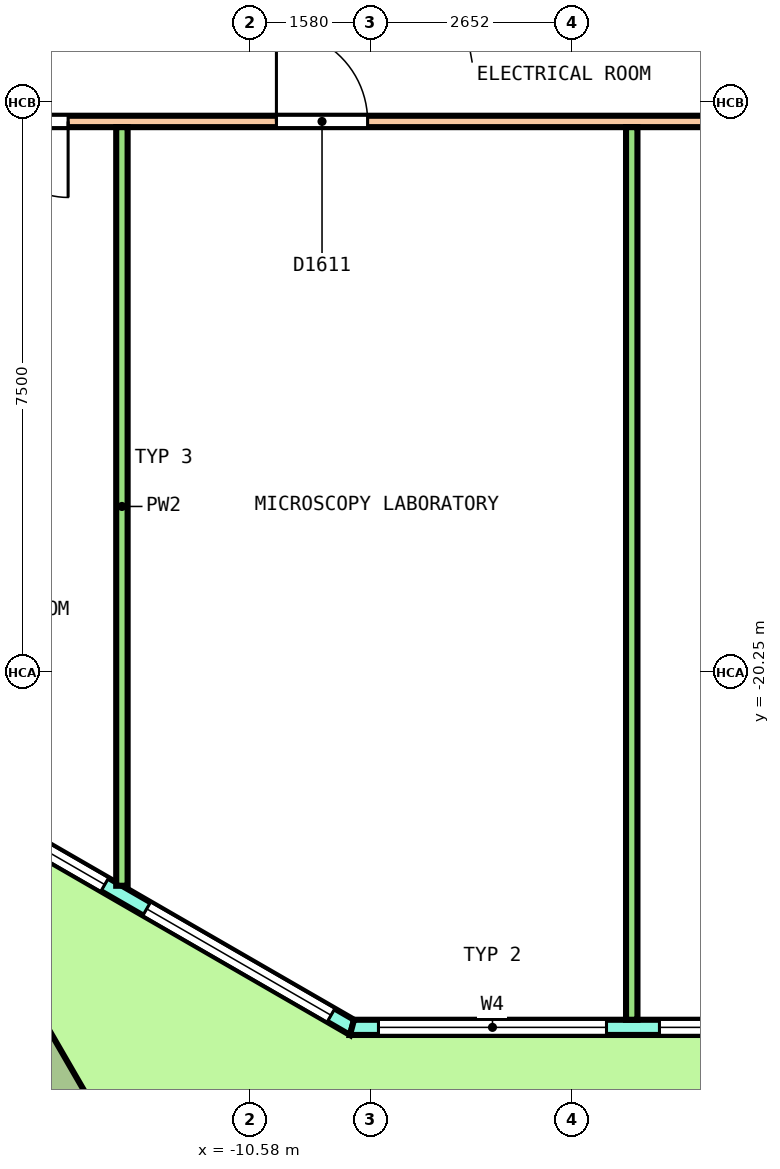
"""IFC4 building model, lengths in metres.
Left out: names, types, materials, properties, quantities, classifications, styles, units other than length and angle.
Written with IfcOpenShell. Run it as: python <this file> out.ifc"""

import sys

from ifc_helpers import new_model, si_unit, direction, frame, frame_2d, origin, origin_2d, place, context, subcontext, project, spatial, polyline, rectangle, outline, extrude, element, fill, save


model = new_model("IFC4")
c1 = context("Model", 3, precision=1e-05, world=origin(), true_north=direction((0.0, 1.0)))
c2 = subcontext(c1, "Body", "Model", "MODEL_VIEW")
j1 = project(units=[si_unit("LENGTHUNIT", "METRE"), si_unit("PLANEANGLEUNIT", "RADIAN")], contexts=[c1])
p1 = place(None, origin())
s1 = spatial("IfcSite", under=j1, at=p1, CompositionType="ELEMENT")
p2 = place(p1, origin())
s2 = spatial("IfcBuilding", under=s1, at=p2, CompositionType="ELEMENT")
p3 = place(p2, frame((0.0, 0.0, 113.2)))
s3 = spatial("IfcBuildingStorey", under=s2, at=p3, CompositionType="ELEMENT", Elevation=113.2)
p4 = place(p3, frame((-13.618, -25.625, 0.0), z_axis=(0.018132630042, -0.031385715123, 0.999342856388), x_axis=(0.866156195426, -0.498787200508, -0.031381104725)))
e1 = element("IfcColumn", 1, at=p4, inside=s3, PredefinedType="COLUMN", context=c2, shape_type="SweptSolid", body=[
    extrude(rectangle(XDim=1.35, YDim=1.35, at=origin_2d()), origin(), (0.0, 0.0, 1.0), 4.053),
])
p5 = place(p3, frame((-15.195, -21.481, 0.0), z_axis=(0.0, 0.0, 1.0), x_axis=(0.866029458321, -0.49999297727, 0.0)))
e2 = element("IfcWall", 2, at=p5, inside=s3, PredefinedType="SOLIDWALL", context=c2, shape_type="SweptSolid", body=[
    extrude(outline(polyline([(-0.027, -0.1), (1.128, -0.1), (2.282, -0.1), (3.437, -0.1), (4.592, -0.1), (5.747, -0.1), (6.901, -0.1), (6.848, 0.1), (5.711, 0.1), (4.574, 0.1), (3.437, 0.1), (2.301, 0.1), (1.164, 0.1), (0.027, 0.1), (-0.027, -0.1)])), origin(), (0.0, 0.0, 1.0), 4.1),
])
p6 = place(p5, frame((0.319, 0.0, 0.1)))
e3 = element("IfcOpeningElement", 3, at=p6, cuts=e2, PredefinedType="OPENING", context=c2, shape_type="SweptSolid", body=[
    extrude(rectangle(XDim=2.8, YDim=2.9, at=frame_2d((1.4, 1.45))), frame((0.0, 0.11, 0.0), z_axis=(0.0, -1.0, 0.0), x_axis=(1.0, 0.0, 0.0)), (0.0, 0.0, 1.0), 0.22),
])
p7 = place(p5, frame((3.756, 0.0, 0.1)))
e4 = element("IfcOpeningElement", 4, at=p7, cuts=e2, PredefinedType="OPENING", context=c2, shape_type="SweptSolid", body=[
    extrude(rectangle(XDim=2.8, YDim=2.9, at=frame_2d((1.4, 1.45))), frame((0.0, 0.11, 0.0), z_axis=(0.0, -1.0, 0.0), x_axis=(1.0, 0.0, 0.0)), (0.0, 0.0, 1.0), 0.22),
])
p8 = place(p3, frame((-9.242, -24.918, 0.0), z_axis=(0.0, 0.0, 1.0), x_axis=(1.0, 0.0, 0.0)))
e5 = element("IfcWall", 5, at=p8, inside=s3, PredefinedType="SOLIDWALL", context=c2, shape_type="SweptSolid", body=[
    extrude(outline(polyline([(-0.027, -0.1), (1.003, -0.1), (2.033, -0.1), (3.063, -0.1), (4.093, -0.1), (5.122, -0.1), (6.152, -0.1), (7.182, -0.1), (8.212, -0.1), (9.242, -0.1), (10.271, -0.1), (11.301, -0.1), (12.331, -0.1), (13.361, -0.1), (14.391, -0.1), (15.421, -0.1), (16.451, -0.1), (17.48, -0.1), (18.51, -0.1), (18.457, 0.1), (17.433, 0.1), (16.409, 0.1), (15.385, 0.1), (14.361, 0.1), (13.337, 0.1), (12.313, 0.1), (11.29, 0.1), (10.266, 0.1), (9.242, 0.1), (8.218, 0.1), (7.194, 0.1), (6.17, 0.1), (5.146, 0.1), (4.122, 0.1), (3.098, 0.1), (2.075, 0.1), (1.051, 0.1), (0.027, 0.1), (-0.027, -0.1)])), origin(), (0.0, 0.0, 1.0), 4.1),
])
p9 = place(p8, frame((0.348, 0.0, 0.1)))
e6 = element("IfcOpeningElement", 6, at=p9, cuts=e5, PredefinedType="OPENING", context=c2, shape_type="SweptSolid", body=[
    extrude(rectangle(XDim=3.0, YDim=2.9, at=frame_2d((1.5, 1.45))), frame((0.0, 0.11, 0.0), z_axis=(0.0, -1.0, 0.0), x_axis=(1.0, 0.0, 0.0)), (0.0, 0.0, 1.0), 0.22),
])
p10 = place(p8, frame((4.045, 0.0, 0.1)))
e7 = element("IfcOpeningElement", 7, at=p10, cuts=e5, PredefinedType="OPENING", context=c2, shape_type="SweptSolid", body=[
    extrude(rectangle(XDim=3.0, YDim=2.9, at=frame_2d((1.5, 1.45))), frame((0.0, 0.11, 0.0), z_axis=(0.0, -1.0, 0.0), x_axis=(1.0, 0.0, 0.0)), (0.0, 0.0, 1.0), 0.22),
])
p11 = place(p8, frame((8.342, 0.0, 0.0)))
e8 = element("IfcOpeningElement", 8, at=p11, cuts=e5, PredefinedType="OPENING", context=c2, shape_type="SweptSolid", body=[
    extrude(rectangle(XDim=1.8, YDim=2.4, at=frame_2d((0.9, 1.2))), frame((0.0, 0.11, 0.0), z_axis=(0.0, -1.0, 0.0), x_axis=(1.0, 0.0, 0.0)), (0.0, 0.0, 1.0), 0.22),
])
p12 = place(p8, frame((8.342, 0.0, 2.55)))
e9 = element("IfcOpeningElement", 9, at=p12, cuts=e5, PredefinedType="OPENING", context=c2, shape_type="SweptSolid", body=[
    extrude(rectangle(XDim=1.8, YDim=0.45, at=frame_2d((0.9, 0.225))), frame((0.0, 0.11, 0.0), z_axis=(0.0, -1.0, 0.0), x_axis=(1.0, 0.0, 0.0)), (0.0, 0.0, 1.0), 0.22),
])
p13 = place(p8, frame((11.438, 0.0, 0.1)))
e10 = element("IfcOpeningElement", 10, at=p13, cuts=e5, PredefinedType="OPENING", context=c2, shape_type="SweptSolid", body=[
    extrude(rectangle(XDim=3.0, YDim=2.9, at=frame_2d((1.5, 1.45))), frame((0.0, 0.11, 0.0), z_axis=(0.0, -1.0, 0.0), x_axis=(1.0, 0.0, 0.0)), (0.0, 0.0, 1.0), 0.22),
])
p14 = place(p8, frame((15.135, 0.0, 0.1)))
e11 = element("IfcOpeningElement", 11, at=p14, cuts=e5, PredefinedType="OPENING", context=c2, shape_type="SweptSolid", body=[
    extrude(rectangle(XDim=3.0, YDim=2.9, at=frame_2d((1.5, 1.45))), frame((0.0, 0.11, 0.0), z_axis=(0.0, -1.0, 0.0), x_axis=(1.0, 0.0, 0.0)), (0.0, 0.0, 1.0), 0.22),
])
p15 = place(p3, frame((-15.35, -13.0, 0.0), z_axis=(0.0, 0.0, 1.0), x_axis=(1.0, 0.0, 0.0)))
e12 = element("IfcWall", 12, at=p15, inside=s3, PredefinedType="PARTITIONING", context=c2, shape_type="SweptSolid", body=[
    extrude(rectangle(XDim=30.675, YDim=0.15, at=frame_2d((15.337, 0.0))), origin(), (0.0, 0.0, 1.0), 3.05),
])
p16 = place(p15, frame((1.374, 0.0, 0.0)))
e13 = element("IfcOpeningElement", 13, at=p16, cuts=e12, PredefinedType="OPENING", context=c2, shape_type="SweptSolid", body=[
    extrude(rectangle(XDim=1.0, YDim=2.1, at=frame_2d((0.5, 1.05))), frame((0.0, 0.085, 0.0), z_axis=(0.0, -1.0, 0.0), x_axis=(1.0, 0.0, 0.0)), (0.0, 0.0, 1.0), 0.17),
])
p17 = place(p15, frame((5.114, 0.0, 0.0)))
e14 = element("IfcOpeningElement", 14, at=p17, cuts=e12, PredefinedType="OPENING", context=c2, shape_type="SweptSolid", body=[
    extrude(rectangle(XDim=1.2, YDim=2.1, at=frame_2d((0.6, 1.05))), frame((0.0, 0.085, 0.0), z_axis=(0.0, -1.0, 0.0), x_axis=(1.0, 0.0, 0.0)), (0.0, 0.0, 1.0), 0.17),
])
p18 = place(p15, frame((17.056, 0.0, 0.0)))
e15 = element("IfcOpeningElement", 15, at=p18, cuts=e12, PredefinedType="OPENING", context=c2, shape_type="SweptSolid", body=[
    extrude(rectangle(XDim=1.2, YDim=2.1, at=frame_2d((0.6, 1.05))), frame((0.0, 0.085, 0.0), z_axis=(0.0, -1.0, 0.0), x_axis=(1.0, 0.0, 0.0)), (0.0, 0.0, 1.0), 0.17),
])
p19 = place(p15, frame((26.421, 0.0, 0.0)))
e16 = element("IfcOpeningElement", 16, at=p19, cuts=e12, PredefinedType="OPENING", context=c2, shape_type="SweptSolid", body=[
    extrude(rectangle(XDim=1.2, YDim=2.1, at=frame_2d((0.6, 1.05))), frame((0.0, 0.085, 0.0), z_axis=(0.0, -1.0, 0.0), x_axis=(1.0, 0.0, 0.0)), (0.0, 0.0, 1.0), 0.17),
])
p20 = place(p3, frame((-12.269, -23.055, 0.0), z_axis=(0.0, 0.0, 1.0), x_axis=(0.0, 1.0, 0.0)))
e17 = element("IfcWall", 17, at=p20, inside=s3, PredefinedType="PARTITIONING", context=c2, shape_type="SweptSolid", body=[
    extrude(rectangle(XDim=9.98, YDim=0.15, at=frame_2d((4.99, 0.0))), origin(), (0.0, 0.0, 1.0), 3.05),
])
p21 = place(p3, frame((-5.561, -24.818, 0.0), z_axis=(0.0, 0.0, 1.0), x_axis=(0.0, 1.0, 0.0)))
e18 = element("IfcWall", 18, at=p21, inside=s3, PredefinedType="PARTITIONING", context=c2, shape_type="SweptSolid", body=[
    extrude(rectangle(XDim=11.743, YDim=0.15, at=frame_2d((5.872, 0.0))), origin(), (0.0, 0.0, 1.0), 3.05),
])
p22 = place(p6, origin())
e19 = element("IfcWindow", 19, at=p22, inside=s3, PartitioningType="SINGLE_PANEL", PredefinedType="WINDOW", context=c2, shape_type="SweptSolid", body=[
    extrude(rectangle(XDim=2.8, YDim=2.9, at=frame_2d((1.4, 1.45))), frame((0.0, 0.03, 0.0), z_axis=(0.0, -1.0, 0.0), x_axis=(1.0, 0.0, 0.0)), (0.0, 0.0, 1.0), 0.06),
])
fill(e3, e19)
p23 = place(p7, origin())
e20 = element("IfcWindow", 20, at=p23, inside=s3, PartitioningType="SINGLE_PANEL", PredefinedType="WINDOW", context=c2, shape_type="SweptSolid", body=[
    extrude(rectangle(XDim=2.8, YDim=2.9, at=frame_2d((1.4, 1.45))), frame((0.0, 0.03, 0.0), z_axis=(0.0, -1.0, 0.0), x_axis=(1.0, 0.0, 0.0)), (0.0, 0.0, 1.0), 0.06),
])
fill(e4, e20)
p24 = place(p9, origin())
e21 = element("IfcWindow", 21, at=p24, inside=s3, PartitioningType="SINGLE_PANEL", PredefinedType="WINDOW", context=c2, shape_type="SweptSolid", body=[
    extrude(rectangle(XDim=3.0, YDim=2.9, at=frame_2d((1.5, 1.45))), frame((0.0, 0.03, 0.0), z_axis=(0.0, -1.0, 0.0), x_axis=(1.0, 0.0, 0.0)), (0.0, 0.0, 1.0), 0.06),
])
fill(e6, e21)
p25 = place(p10, origin())
e22 = element("IfcWindow", 22, at=p25, inside=s3, PartitioningType="SINGLE_PANEL", PredefinedType="WINDOW", context=c2, shape_type="SweptSolid", body=[
    extrude(rectangle(XDim=3.0, YDim=2.9, at=frame_2d((1.5, 1.45))), frame((0.0, 0.03, 0.0), z_axis=(0.0, -1.0, 0.0), x_axis=(1.0, 0.0, 0.0)), (0.0, 0.0, 1.0), 0.06),
])
fill(e7, e22)
p26 = place(p16, origin())
e23 = element("IfcDoor", 23, at=p26, inside=s3, OperationType="SINGLE_SWING_LEFT", PredefinedType="DOOR", context=c2, shape_type="SweptSolid", body=[
    extrude(rectangle(XDim=1.0, YDim=2.1, at=frame_2d((0.5, 1.05))), frame((0.0, 0.025, 0.0), z_axis=(0.0, -1.0, 0.0), x_axis=(1.0, 0.0, 0.0)), (0.0, 0.0, 1.0), 0.05),
])
fill(e13, e23)
p27 = place(p17, origin())
e24 = element("IfcDoor", 24, at=p27, inside=s3, OperationType="DOUBLE_DOOR_SINGLE_SWING", PredefinedType="DOOR", context=c2, shape_type="SweptSolid", body=[
    extrude(rectangle(XDim=1.2, YDim=2.1, at=frame_2d((0.6, 1.05))), frame((0.0, 0.025, 0.0), z_axis=(0.0, -1.0, 0.0), x_axis=(1.0, 0.0, 0.0)), (0.0, 0.0, 1.0), 0.05),
])
fill(e14, e24)
save(model, sys.argv[1])
